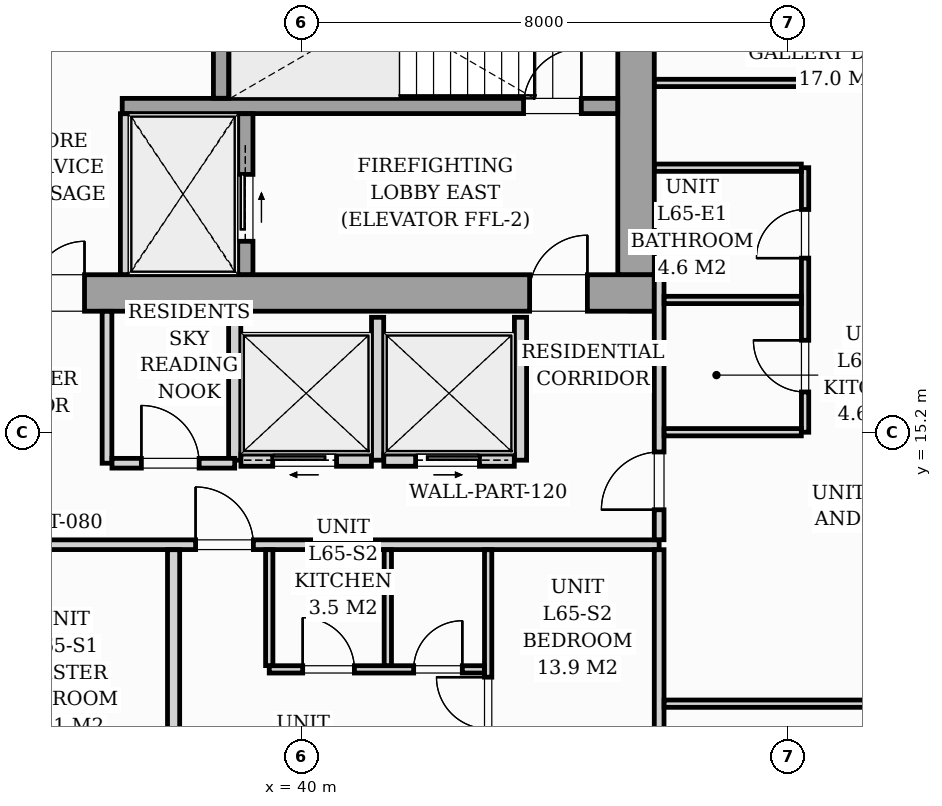
"""IFC4 building model, lengths in metres.
Left out: names, types, materials, properties, quantities, classifications, styles, units other than length and angle.
Written with IfcOpenShell. Run it as: python <this file> out.ifc"""

import sys

from ifc_helpers import new_model, si_unit, direction, frame, frame_2d, origin, origin_2d, place, context, subcontext, project, spatial, rectangle, i_section, extrude, source, transform, mapped, element, fill, save


model = new_model("IFC4")
c1 = context("Model", 3, precision=1e-05, world=origin(), true_north=direction((0.0, 1.0)))
c2 = subcontext(c1, "Body", "Model", "MODEL_VIEW")
j1 = project(units=[si_unit("LENGTHUNIT", "METRE"), si_unit("PLANEANGLEUNIT", "RADIAN")], contexts=[c1])
p1 = place(None, origin())
s1 = spatial("IfcSite", under=j1, at=p1, CompositionType="ELEMENT")
p2 = place(p1, origin())
s2 = spatial("IfcBuilding", under=s1, at=p2, CompositionType="ELEMENT")
p3 = place(p2, frame((0.0, 0.0, 226.5)))
s3 = spatial("IfcBuildingStorey", under=s2, at=p3, CompositionType="ELEMENT", Elevation=226.5)
m1 = source(origin(), c2, "Body", "SweptSolid", [
    extrude(i_section(OverallWidth=0.409, OverallDepth=0.425, WebThickness=0.033, FlangeThickness=0.052, FilletRadius=0.018, at=origin_2d()), origin(), (0.0, 0.0, 1.0), 3.296),
])
for number, where, z_axis, x_axis in (
    (1, (38.88, 17.4, 0.002), (0.0, 0.0, 1.0), (1.0, 0.0, 0.0)),
    (2, (45.6, 17.4, 0.002), (0.0, 0.0, 1.0), (1.0, 0.0, 0.0)),
):
    element("IfcColumn", number, at=place(p3, frame(where, z_axis=z_axis, x_axis=x_axis)), inside=s3, PredefinedType="PILASTER", context=c2, shape_type="MappedRepresentation", body=[
        mapped(m1, transform((0.0, 0.0, 0.0), scale=1.0)),
    ])
p4 = place(p3, frame((26.2, 17.5, 0.0), z_axis=(0.0, 0.0, 1.0), x_axis=(1.0, 0.0, 0.0)))
e3 = element("IfcWall", 3, at=p4, inside=s3, PredefinedType="SHEAR", context=c2, shape_type="SweptSolid", body=[
    extrude(rectangle(XDim=19.6, YDim=0.6, at=frame_2d((9.8, 0.0))), origin(), (0.0, 0.0, 1.0), 3.3),
])
p5 = place(p4, frame((0.95, 0.0, 0.0)))
e4 = element("IfcOpeningElement", 4, at=p5, cuts=e3, PredefinedType="OPENING", context=c2, shape_type="SweptSolid", body=[
    extrude(rectangle(XDim=0.95, YDim=2.06, at=frame_2d((0.475, 1.03))), frame((0.0, 0.31, 0.0), z_axis=(0.0, -1.0, 0.0), x_axis=(1.0, 0.0, 0.0)), (0.0, 0.0, 1.0), 0.62),
])
p6 = place(p4, frame((9.38, 0.0, 0.0)))
e5 = element("IfcOpeningElement", 5, at=p6, cuts=e3, PredefinedType="OPENING", context=c2, shape_type="SweptSolid", body=[
    extrude(rectangle(XDim=0.85, YDim=2.0, at=frame_2d((0.425, 1.0))), frame((0.0, 0.31, 0.0), z_axis=(0.0, -1.0, 0.0), x_axis=(1.0, 0.0, 0.0)), (0.0, 0.0, 1.0), 0.62),
])
p7 = place(p4, frame((17.55, 0.0, 0.0)))
e6 = element("IfcOpeningElement", 6, at=p7, cuts=e3, PredefinedType="OPENING", context=c2, shape_type="SweptSolid", body=[
    extrude(rectangle(XDim=0.95, YDim=2.06, at=frame_2d((0.475, 1.03))), frame((0.0, 0.31, 0.0), z_axis=(0.0, -1.0, 0.0), x_axis=(1.0, 0.0, 0.0)), (0.0, 0.0, 1.0), 0.62),
])
p8 = place(p3, frame((45.5, 17.802, 0.0), z_axis=(0.0, 0.0, 1.0), x_axis=(0.0, 1.0, 0.0)))
e7 = element("IfcWall", 7, at=p8, inside=s3, PredefinedType="SHEAR", context=c2, shape_type="SweptSolid", body=[
    extrude(rectangle(XDim=5.796, YDim=0.6, at=frame_2d((2.898, 0.0))), origin(), (0.0, 0.0, 1.0), 3.3),
])
p9 = place(p3, frame((37.05, 20.575, 0.0), z_axis=(0.0, 0.0, 1.0), x_axis=(1.0, 0.0, 0.0)))
e8 = element("IfcWall", 8, at=p9, inside=s3, PredefinedType="SOLIDWALL", context=c2, shape_type="SweptSolid", body=[
    extrude(rectangle(XDim=8.148, YDim=0.25, at=frame_2d((4.074, 0.0))), origin(), (0.0, 0.0, 1.0), 3.3),
])
p10 = place(p9, frame((6.6, 0.0, 0.0)))
e9 = element("IfcOpeningElement", 9, at=p10, cuts=e8, PredefinedType="OPENING", context=c2, shape_type="SweptSolid", body=[
    extrude(rectangle(XDim=0.95, YDim=2.06, at=frame_2d((0.475, 1.03))), frame((0.0, 0.135, 0.0), z_axis=(0.0, -1.0, 0.0), x_axis=(1.0, 0.0, 0.0)), (0.0, 0.0, 1.0), 0.27),
])
p11 = place(p3, frame((38.675, 20.702, 0.0), z_axis=(0.0, 0.0, 1.0), x_axis=(0.0, 1.0, 0.0)))
e10 = element("IfcWall", 10, at=p11, inside=s3, PredefinedType="SOLIDWALL", context=c2, shape_type="SweptSolid", body=[
    extrude(rectangle(XDim=2.896, YDim=0.25, at=frame_2d((1.448, 0.0))), origin(), (0.0, 0.0, 1.0), 3.3),
])
p12 = place(p3, frame((37.1, 17.802, 0.0), z_axis=(0.0, 0.0, 1.0), x_axis=(0.0, 1.0, 0.0)))
e11 = element("IfcWall", 11, at=p12, inside=s3, PredefinedType="PARTITIONING", context=c2, shape_type="SweptSolid", body=[
    extrude(rectangle(XDim=2.646, YDim=0.16, at=frame_2d((1.323, 0.0))), origin(), (0.0, 0.0, 1.0), 3.04),
])
p13 = place(p3, frame((39.075, 17.802, 0.0), z_axis=(0.0, 0.0, 1.0), x_axis=(0.0, 1.0, 0.0)))
e12 = element("IfcWall", 12, at=p13, inside=s3, PredefinedType="SOLIDWALL", context=c2, shape_type="SweptSolid", body=[
    extrude(rectangle(XDim=2.646, YDim=0.25, at=frame_2d((1.323, 0.0))), origin(), (0.0, 0.0, 1.0), 3.3),
])
p14 = place(p13, frame((0.548, 0.0, 0.0)))
e13 = element("IfcOpeningElement", 13, at=p14, cuts=e12, PredefinedType="OPENING", context=c2, shape_type="SweptSolid", body=[
    extrude(rectangle(XDim=1.1, YDim=2.08, at=frame_2d((0.55, 1.04))), frame((0.0, 0.135, 0.0), z_axis=(0.0, -1.0, 0.0), x_axis=(1.0, 0.0, 0.0)), (0.0, 0.0, 1.0), 0.27),
])
for number, where, z_axis, x_axis in (
    (14, (38.9, 14.75, 0.0), (0.0, 0.0, 1.0), (0.0, 1.0, 0.0)),
    (15, (41.25, 14.75, 0.0), (0.0, 0.0, 1.0), (0.0, 1.0, 0.0)),
    (16, (43.6, 14.75, 0.0), (0.0, 0.0, 1.0), (0.0, 1.0, 0.0)),
):
    element("IfcWall", number, at=place(p3, frame(where, z_axis=z_axis, x_axis=x_axis)), inside=s3, PredefinedType="PARTITIONING", context=c2, shape_type="SweptSolid", body=[
        extrude(rectangle(XDim=2.35, YDim=0.2, at=frame_2d((1.175, 0.0))), origin(), (0.0, 0.0, 1.0), 3.04),
    ])
p15 = place(p3, frame((39.002, 14.75, 0.0), z_axis=(0.0, 0.0, 1.0), x_axis=(1.0, 0.0, 0.0)))
e17 = element("IfcWall", 17, at=p15, inside=s3, PredefinedType="PARTITIONING", context=c2, shape_type="SweptSolid", body=[
    extrude(rectangle(XDim=2.146, YDim=0.2, at=frame_2d((1.073, 0.0))), origin(), (0.0, 0.0, 1.0), 3.04),
])
p16 = place(p15, frame((0.523, 0.0, 0.0)))
e18 = element("IfcOpeningElement", 18, at=p16, cuts=e17, PredefinedType="OPENING", context=c2, shape_type="SweptSolid", body=[
    extrude(rectangle(XDim=1.05, YDim=2.08, at=frame_2d((0.525, 1.04))), frame((0.0, 0.11, 0.0), z_axis=(0.0, -1.0, 0.0), x_axis=(1.0, 0.0, 0.0)), (0.0, 0.0, 1.0), 0.22),
])
p17 = place(p3, frame((41.352, 14.75, 0.0), z_axis=(0.0, 0.0, 1.0), x_axis=(1.0, 0.0, 0.0)))
e19 = element("IfcWall", 19, at=p17, inside=s3, PredefinedType="PARTITIONING", context=c2, shape_type="SweptSolid", body=[
    extrude(rectangle(XDim=2.146, YDim=0.2, at=frame_2d((1.073, 0.0))), origin(), (0.0, 0.0, 1.0), 3.04),
])
p18 = place(p17, frame((0.523, 0.0, 0.0)))
e20 = element("IfcOpeningElement", 20, at=p18, cuts=e19, PredefinedType="OPENING", context=c2, shape_type="SweptSolid", body=[
    extrude(rectangle(XDim=1.05, YDim=2.08, at=frame_2d((0.525, 1.04))), frame((0.0, 0.11, 0.0), z_axis=(0.0, -1.0, 0.0), x_axis=(1.0, 0.0, 0.0)), (0.0, 0.0, 1.0), 0.22),
])
p19 = place(p3, frame((24.55, 13.36, 0.0), z_axis=(0.0, 0.0, 1.0), x_axis=(1.0, 0.0, 0.0)))
e21 = element("IfcWall", 21, at=p19, inside=s3, PredefinedType="PARTITIONING", context=c2, shape_type="SweptSolid", body=[
    extrude(rectangle(XDim=21.33, YDim=0.16, at=frame_2d((10.665, 0.0))), origin(), (0.0, 0.0, 1.0), 2.605),
])
p20 = place(p19, frame((2.37, 0.0, 0.0)))
e22 = element("IfcOpeningElement", 22, at=p20, cuts=e21, PredefinedType="OPENING", context=c2, shape_type="SweptSolid", body=[
    extrude(rectangle(XDim=0.95, YDim=2.06, at=frame_2d((0.475, 1.03))), frame((0.0, 0.09, 0.0), z_axis=(0.0, -1.0, 0.0), x_axis=(1.0, 0.0, 0.0)), (0.0, 0.0, 1.0), 0.18),
])
p21 = place(p19, frame((13.707, 0.0, 0.0)))
e23 = element("IfcOpeningElement", 23, at=p21, cuts=e21, PredefinedType="OPENING", context=c2, shape_type="SweptSolid", body=[
    extrude(rectangle(XDim=0.95, YDim=2.06, at=frame_2d((0.475, 1.03))), frame((0.0, 0.09, 0.0), z_axis=(0.0, -1.0, 0.0), x_axis=(1.0, 0.0, 0.0)), (0.0, 0.0, 1.0), 0.18),
])
p22 = place(p3, frame((45.88, 8.136, 0.0), z_axis=(0.0, 0.0, 1.0), x_axis=(0.0, 1.0, 0.0)))
e24 = element("IfcWall", 24, at=p22, inside=s3, PredefinedType="PARTITIONING", context=c2, shape_type="SweptSolid", body=[
    extrude(rectangle(XDim=5.142, YDim=0.16, at=frame_2d((2.571, 0.0))), origin(), (0.0, 0.0, 1.0), 3.04),
])
p23 = place(p3, frame((45.88, 13.442, 0.0), z_axis=(0.0, 0.0, 1.0), x_axis=(0.0, 1.0, 0.0)))
e25 = element("IfcWall", 25, at=p23, inside=s3, PredefinedType="PARTITIONING", context=c2, shape_type="SweptSolid", body=[
    extrude(rectangle(XDim=4.36, YDim=0.16, at=frame_2d((2.18, 0.0))), origin(), (0.0, 0.0, 1.0), 3.04),
])
p24 = place(p23, frame((0.493, 0.0, 0.0)))
e26 = element("IfcOpeningElement", 26, at=p24, cuts=e25, PredefinedType="OPENING", context=c2, shape_type="SweptSolid", body=[
    extrude(rectangle(XDim=0.95, YDim=2.06, at=frame_2d((0.475, 1.03))), frame((0.0, 0.09, 0.0), z_axis=(0.0, -1.0, 0.0), x_axis=(1.0, 0.0, 0.0)), (0.0, 0.0, 1.0), 0.18),
])
p25 = place(p3, frame((37.895, 8.68, 0.0), z_axis=(0.0, 0.0, 1.0), x_axis=(0.0, 1.0, 0.0)))
e27 = element("IfcWall", 27, at=p25, inside=s3, PredefinedType="PARTITIONING", context=c2, shape_type="SweptSolid", body=[
    extrude(rectangle(XDim=4.598, YDim=0.2, at=frame_2d((2.299, 0.0))), origin(), (0.0, 0.0, 1.0), 3.04),
])
p26 = place(p3, frame((43.068, 8.392, 0.0), z_axis=(0.0, 0.0, 1.0), x_axis=(0.0, 1.0, 0.0)))
e28 = element("IfcWall", 28, at=p26, inside=s3, PredefinedType="PARTITIONING", context=c2, shape_type="SweptSolid", body=[
    extrude(rectangle(XDim=4.886, YDim=0.12, at=frame_2d((2.443, 0.0))), origin(), (0.0, 0.0, 1.0), 3.04),
])
p27 = place(p26, frame((1.94, 0.0, 0.0)))
e29 = element("IfcOpeningElement", 29, at=p27, cuts=e28, PredefinedType="OPENING", context=c2, shape_type="SweptSolid", body=[
    extrude(rectangle(XDim=0.85, YDim=2.05, at=frame_2d((0.425, 1.025))), frame((0.0, 0.07, 0.0), z_axis=(0.0, -1.0, 0.0), x_axis=(1.0, 0.0, 0.0)), (0.0, 0.0, 1.0), 0.14),
])
p28 = place(p3, frame((39.468, 11.31, 0.0), z_axis=(0.0, 0.0, 1.0), x_axis=(1.0, 0.0, 0.0)))
e30 = element("IfcWall", 30, at=p28, inside=s3, PredefinedType="PARTITIONING", context=c2, shape_type="SweptSolid", body=[
    extrude(rectangle(XDim=3.538, YDim=0.12, at=frame_2d((1.769, 0.0))), origin(), (0.0, 0.0, 1.0), 3.04),
])
p29 = place(p28, frame((0.55, 0.0, 0.0)))
e31 = element("IfcOpeningElement", 31, at=p29, cuts=e30, PredefinedType="OPENING", context=c2, shape_type="SweptSolid", body=[
    extrude(rectangle(XDim=0.85, YDim=2.05, at=frame_2d((0.425, 1.025))), frame((0.0, 0.07, 0.0), z_axis=(0.0, -1.0, 0.0), x_axis=(1.0, 0.0, 0.0)), (0.0, 0.0, 1.0), 0.14),
])
p30 = place(p28, frame((2.375, 0.0, 0.0)))
e32 = element("IfcOpeningElement", 32, at=p30, cuts=e30, PredefinedType="OPENING", context=c2, shape_type="SweptSolid", body=[
    extrude(rectangle(XDim=0.8, YDim=2.02, at=frame_2d((0.4, 1.01))), frame((0.0, 0.07, 0.0), z_axis=(0.0, -1.0, 0.0), x_axis=(1.0, 0.0, 0.0)), (0.0, 0.0, 1.0), 0.14),
])
for number, where, z_axis, x_axis in (
    (33, (39.468, 11.372, 0.0), (0.0, 0.0, 1.0), (0.0, 1.0, 0.0)),
    (34, (41.418, 11.372, 0.0), (0.0, 0.0, 1.0), (0.0, 1.0, 0.0)),
):
    element("IfcWall", number, at=place(p3, frame(where, z_axis=z_axis, x_axis=x_axis)), inside=s3, PredefinedType="PARTITIONING", context=c2, shape_type="SweptSolid", body=[
        extrude(rectangle(XDim=1.906, YDim=0.12, at=frame_2d((0.953, 0.0))), origin(), (0.0, 0.0, 1.0), 3.04),
    ])
p31 = place(p3, frame((48.28, 15.21, 0.0), z_axis=(0.0, 0.0, 1.0), x_axis=(0.0, 1.0, 0.0)))
e35 = element("IfcWall", 35, at=p31, inside=s3, PredefinedType="PARTITIONING", context=c2, shape_type="SweptSolid", body=[
    extrude(rectangle(XDim=4.35, YDim=0.12, at=frame_2d((2.175, 0.0))), origin(), (0.0, 0.0, 1.0), 3.04),
])
p32 = place(p31, frame((0.662, 0.0, 0.0)))
e36 = element("IfcOpeningElement", 36, at=p32, cuts=e35, PredefinedType="OPENING", context=c2, shape_type="SweptSolid", body=[
    extrude(rectangle(XDim=0.85, YDim=2.05, at=frame_2d((0.425, 1.025))), frame((0.0, 0.07, 0.0), z_axis=(0.0, -1.0, 0.0), x_axis=(1.0, 0.0, 0.0)), (0.0, 0.0, 1.0), 0.14),
])
p33 = place(p31, frame((2.863, 0.0, 0.0)))
e37 = element("IfcOpeningElement", 37, at=p33, cuts=e35, PredefinedType="OPENING", context=c2, shape_type="SweptSolid", body=[
    extrude(rectangle(XDim=0.8, YDim=2.02, at=frame_2d((0.4, 1.01))), frame((0.0, 0.07, 0.0), z_axis=(0.0, -1.0, 0.0), x_axis=(1.0, 0.0, 0.0)), (0.0, 0.0, 1.0), 0.14),
])
p34 = place(p3, frame((45.962, 17.385, 0.0), z_axis=(0.0, 0.0, 1.0), x_axis=(1.0, 0.0, 0.0)))
e38 = element("IfcWall", 38, at=p34, inside=s3, PredefinedType="PARTITIONING", context=c2, shape_type="SweptSolid", body=[
    extrude(rectangle(XDim=2.256, YDim=0.12, at=frame_2d((1.128, 0.0))), origin(), (0.0, 0.0, 1.0), 2.381),
])
p35 = place(p3, frame((45.962, 15.21, 0.0), z_axis=(0.0, 0.0, 1.0), x_axis=(1.0, 0.0, 0.0)))
e39 = element("IfcWall", 39, at=p35, inside=s3, PredefinedType="PARTITIONING", context=c2, shape_type="SweptSolid", body=[
    extrude(rectangle(XDim=2.256, YDim=0.12, at=frame_2d((1.128, 0.0))), origin(), (0.0, 0.0, 1.0), 3.04),
])
p36 = place(p3, frame((45.802, 19.56, 0.0), z_axis=(0.0, 0.0, 1.0), x_axis=(1.0, 0.0, 0.0)))
e40 = element("IfcWall", 40, at=p36, inside=s3, PredefinedType="PARTITIONING", context=c2, shape_type="SweptSolid", body=[
    extrude(rectangle(XDim=2.416, YDim=0.12, at=frame_2d((1.208, 0.0))), origin(), (0.0, 0.0, 1.0), 3.04),
])
p37 = place(p3, frame((45.962, 10.746, 0.0), z_axis=(0.0, 0.0, 1.0), x_axis=(1.0, 0.0, 0.0)))
e41 = element("IfcWall", 41, at=p37, inside=s3, PredefinedType="PARTITIONING", context=c2, shape_type="SweptSolid", body=[
    extrude(rectangle(XDim=9.594, YDim=0.12, at=frame_2d((4.797, 0.0))), origin(), (0.0, 0.0, 1.0), 3.04),
])
p38 = place(p37, frame((4.378, 0.0, 0.0)))
e42 = element("IfcOpeningElement", 42, at=p38, cuts=e41, PredefinedType="OPENING", context=c2, shape_type="SweptSolid", body=[
    extrude(rectangle(XDim=0.85, YDim=2.05, at=frame_2d((0.425, 1.025))), frame((0.0, 0.07, 0.0), z_axis=(0.0, -1.0, 0.0), x_axis=(1.0, 0.0, 0.0)), (0.0, 0.0, 1.0), 0.14),
])
p39 = place(p3, frame((45.802, 20.954, 0.0), z_axis=(0.0, 0.0, 1.0), x_axis=(1.0, 0.0, 0.0)))
e43 = element("IfcWall", 43, at=p39, inside=s3, PredefinedType="PARTITIONING", context=c2, shape_type="SweptSolid", body=[
    extrude(rectangle(XDim=10.683, YDim=0.12, at=frame_2d((5.342, 0.0))), origin(), (0.0, 0.0, 1.0), 3.04),
])
p40 = place(p39, frame((5.062, 0.0, 0.0)))
e44 = element("IfcOpeningElement", 44, at=p40, cuts=e43, PredefinedType="OPENING", context=c2, shape_type="SweptSolid", body=[
    extrude(rectangle(XDim=0.85, YDim=2.05, at=frame_2d((0.425, 1.025))), frame((0.0, 0.07, 0.0), z_axis=(0.0, -1.0, 0.0), x_axis=(1.0, 0.0, 0.0)), (0.0, 0.0, 1.0), 0.14),
])
p41 = place(p3, frame((36.8, 14.7, 0.0), z_axis=(0.0, 0.0, 1.0), x_axis=(0.0, 1.0, 0.0)))
e45 = element("IfcWall", 45, at=p41, inside=s3, PredefinedType="PARTITIONING", context=c2, shape_type="SweptSolid", body=[
    extrude(rectangle(XDim=2.498, YDim=0.16, at=frame_2d((1.249, 0.0))), origin(), (0.0, 0.0, 1.0), 3.04),
])
p42 = place(p3, frame((36.882, 14.7, 0.0), z_axis=(0.0, 0.0, 1.0), x_axis=(1.0, 0.0, 0.0)))
e46 = element("IfcWall", 46, at=p42, inside=s3, PredefinedType="PARTITIONING", context=c2, shape_type="SweptSolid", body=[
    extrude(rectangle(XDim=2.018, YDim=0.16, at=frame_2d((1.009, 0.0))), origin(), (0.0, 0.0, 1.0), 3.04),
])
p43 = place(p42, frame((0.483, 0.0, 0.0)))
e47 = element("IfcOpeningElement", 47, at=p43, cuts=e46, PredefinedType="OPENING", context=c2, shape_type="SweptSolid", body=[
    extrude(rectangle(XDim=0.95, YDim=2.06, at=frame_2d((0.475, 1.03))), frame((0.0, 0.09, 0.0), z_axis=(0.0, -1.0, 0.0), x_axis=(1.0, 0.0, 0.0)), (0.0, 0.0, 1.0), 0.18),
])
m2 = source(origin(), c2, "Body", "SweptSolid", [
    extrude(rectangle(XDim=0.85, YDim=2.0, at=frame_2d((0.425, 1.0))), frame((0.0, 0.025, 0.0), z_axis=(0.0, -1.0, 0.0), x_axis=(1.0, 0.0, 0.0)), (0.0, 0.0, 1.0), 0.05),
])
p44 = place(p6, origin())
e48 = element("IfcDoor", 48, at=p44, inside=s3, OperationType="SINGLE_SWING_RIGHT", PredefinedType="DOOR", context=c2, shape_type="MappedRepresentation", body=[
    mapped(m2, transform((0.0, 0.0, 0.0), scale=1.0)),
])
fill(e5, e48)
m3 = source(origin(), c2, "Body", "SweptSolid", [
    extrude(rectangle(XDim=0.95, YDim=2.06, at=frame_2d((0.475, 1.03))), frame((0.0, 0.025, 0.0), z_axis=(0.0, -1.0, 0.0), x_axis=(1.0, 0.0, 0.0)), (0.0, 0.0, 1.0), 0.05),
])
p45 = place(p7, origin())
e49 = element("IfcDoor", 49, at=p45, inside=s3, OperationType="SINGLE_SWING_RIGHT", PredefinedType="DOOR", context=c2, shape_type="MappedRepresentation", body=[
    mapped(m3, transform((0.0, 0.0, 0.0), scale=1.0)),
])
fill(e6, e49)
p46 = place(p10, origin())
e50 = element("IfcDoor", 50, at=p46, inside=s3, OperationType="SINGLE_SWING_RIGHT", PredefinedType="DOOR", context=c2, shape_type="MappedRepresentation", body=[
    mapped(m3, transform((0.0, 0.0, 0.0), scale=1.0)),
])
fill(e9, e50)
m4 = source(origin(), c2, "Body", "SweptSolid", [
    extrude(rectangle(XDim=1.1, YDim=2.08, at=frame_2d((0.55, 1.04))), frame((0.0, 0.025, 0.0), z_axis=(0.0, -1.0, 0.0), x_axis=(1.0, 0.0, 0.0)), (0.0, 0.0, 1.0), 0.05),
])
p47 = place(p14, origin())
e51 = element("IfcDoor", 51, at=p47, inside=s3, OperationType="SLIDING_TO_RIGHT", PredefinedType="DOOR", context=c2, shape_type="MappedRepresentation", body=[
    mapped(m4, transform((0.0, 0.0, 0.0), scale=1.0)),
])
fill(e13, e51)
m5 = source(origin(), c2, "Body", "SweptSolid", [
    extrude(rectangle(XDim=1.05, YDim=2.08, at=frame_2d((0.525, 1.04))), frame((0.0, 0.025, 0.0), z_axis=(0.0, -1.0, 0.0), x_axis=(1.0, 0.0, 0.0)), (0.0, 0.0, 1.0), 0.05),
])
p48 = place(p16, origin())
e52 = element("IfcDoor", 52, at=p48, inside=s3, OperationType="SLIDING_TO_LEFT", PredefinedType="DOOR", context=c2, shape_type="MappedRepresentation", body=[
    mapped(m5, transform((0.0, 0.0, 0.0), scale=1.0)),
])
fill(e18, e52)
p49 = place(p18, origin())
e53 = element("IfcDoor", 53, at=p49, inside=s3, OperationType="SLIDING_TO_RIGHT", PredefinedType="DOOR", context=c2, shape_type="MappedRepresentation", body=[
    mapped(m5, transform((0.0, 0.0, 0.0), scale=1.0)),
])
fill(e20, e53)
m6 = source(origin(), c2, "Body", "SweptSolid", [
    extrude(rectangle(XDim=0.95, YDim=2.06, at=frame_2d((0.475, 1.03))), frame((0.0, 0.025, 0.0), z_axis=(0.0, -1.0, 0.0), x_axis=(1.0, 0.0, 0.0)), (0.0, 0.0, 1.0), 0.05),
])
p50 = place(p21, origin())
e54 = element("IfcDoor", 54, at=p50, inside=s3, OperationType="SINGLE_SWING_LEFT", PredefinedType="DOOR", context=c2, shape_type="MappedRepresentation", body=[
    mapped(m6, transform((0.0, 0.0, 0.0), scale=1.0)),
])
fill(e23, e54)
m7 = source(origin(), c2, "Body", "SweptSolid", [
    extrude(rectangle(XDim=0.85, YDim=2.05, at=frame_2d((0.425, 1.025))), frame((0.0, 0.025, 0.0), z_axis=(0.0, -1.0, 0.0), x_axis=(1.0, 0.0, 0.0)), (0.0, 0.0, 1.0), 0.05),
])
p51 = place(p27, origin())
e55 = element("IfcDoor", 55, at=p51, inside=s3, OperationType="SINGLE_SWING_RIGHT", PredefinedType="DOOR", context=c2, shape_type="MappedRepresentation", body=[
    mapped(m7, transform((0.0, 0.0, 0.0), scale=1.0)),
])
fill(e29, e55)
p52 = place(p29, origin())
e56 = element("IfcDoor", 56, at=p52, inside=s3, OperationType="SINGLE_SWING_LEFT", PredefinedType="DOOR", context=c2, shape_type="MappedRepresentation", body=[
    mapped(m7, transform((0.0, 0.0, 0.0), scale=1.0)),
])
fill(e31, e56)
m8 = source(origin(), c2, "Body", "SweptSolid", [
    extrude(rectangle(XDim=0.8, YDim=2.02, at=frame_2d((0.4, 1.01))), frame((0.0, 0.025, 0.0), z_axis=(0.0, -1.0, 0.0), x_axis=(1.0, 0.0, 0.0)), (0.0, 0.0, 1.0), 0.05),
])
p53 = place(p30, origin())
e57 = element("IfcDoor", 57, at=p53, inside=s3, OperationType="SINGLE_SWING_RIGHT", PredefinedType="DOOR", context=c2, shape_type="MappedRepresentation", body=[
    mapped(m8, transform((0.0, 0.0, 0.0), scale=1.0)),
])
fill(e32, e57)
p54 = place(p24, origin())
e58 = element("IfcDoor", 58, at=p54, inside=s3, OperationType="SINGLE_SWING_LEFT", PredefinedType="DOOR", context=c2, shape_type="MappedRepresentation", body=[
    mapped(m6, transform((0.0, 0.0, 0.0), scale=1.0)),
])
fill(e26, e58)
p55 = place(p32, origin())
e59 = element("IfcDoor", 59, at=p55, inside=s3, OperationType="SINGLE_SWING_RIGHT", PredefinedType="DOOR", context=c2, shape_type="MappedRepresentation", body=[
    mapped(m7, transform((0.0, 0.0, 0.0), scale=1.0)),
])
fill(e36, e59)
p56 = place(p33, origin())
e60 = element("IfcDoor", 60, at=p56, inside=s3, OperationType="SINGLE_SWING_LEFT", PredefinedType="DOOR", context=c2, shape_type="MappedRepresentation", body=[
    mapped(m8, transform((0.0, 0.0, 0.0), scale=1.0)),
])
fill(e37, e60)
p57 = place(p43, origin())
e61 = element("IfcDoor", 61, at=p57, inside=s3, OperationType="SINGLE_SWING_LEFT", PredefinedType="DOOR", context=c2, shape_type="MappedRepresentation", body=[
    mapped(m6, transform((0.0, 0.0, 0.0), scale=1.0)),
])
fill(e47, e61)
save(model, sys.argv[1])
